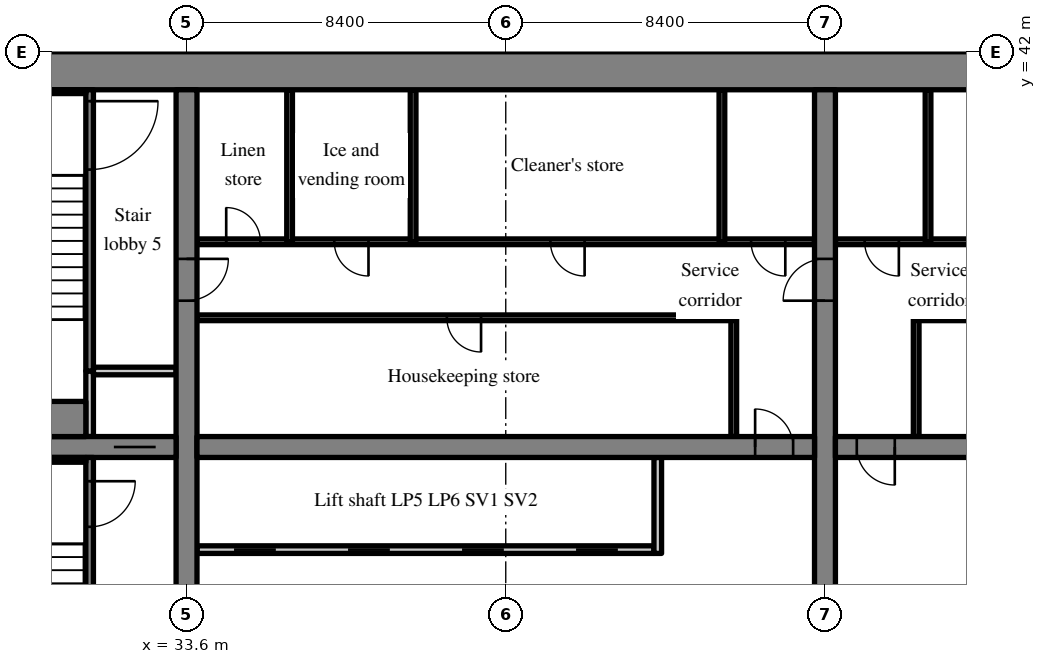
"""IFC4 building model, lengths in metres.
Left out: names, types, materials, properties, quantities, classifications, styles, units other than length and angle.
Written with IfcOpenShell. Run it as: python <this file> out.ifc"""

import sys

from ifc_helpers import new_model, si_unit, direction, frame, frame_2d, origin, place, context, subcontext, project, spatial, rectangle, extrude, source, transform, mapped, element, fill, save


model = new_model("IFC4")
c1 = context("Model", 3, precision=1e-05, world=origin(), true_north=direction((0.0, 1.0)))
c2 = subcontext(c1, "Body", "Model", "MODEL_VIEW")
j1 = project(units=[si_unit("LENGTHUNIT", "METRE"), si_unit("PLANEANGLEUNIT", "RADIAN")], contexts=[c1])
p1 = place(None, origin())
s1 = spatial("IfcSite", under=j1, at=p1, CompositionType="ELEMENT")
p2 = place(p1, origin())
s2 = spatial("IfcBuilding", under=s1, at=p2, CompositionType="ELEMENT")
p3 = place(p2, frame((0.0, 0.0, 54.4)))
s3 = spatial("IfcBuildingStorey", under=s2, at=p3, CompositionType="ELEMENT", Elevation=54.4)
m1 = source(origin(), c2, "Body", "SweptSolid", [
    extrude(rectangle(XDim=50.4, YDim=1.0, at=frame_2d((25.2, 0.0))), origin(), (0.0, 0.0, 1.0), 3.52),
])
p4 = place(p3, frame((25.2, 41.5, 0.0), z_axis=(0.0, 0.0, 1.0), x_axis=(1.0, 0.0, 0.0)))
e1 = element("IfcWall", 1, at=p4, inside=s3, PredefinedType="SHEAR", context=c2, shape_type="MappedRepresentation", body=[
    mapped(m1, transform((0.0, 0.0, 0.0), scale=1.0)),
])
m2 = source(origin(), c2, "Body", "SweptSolid", [
    extrude(rectangle(XDim=18.0, YDim=0.55, at=frame_2d((9.0, 0.0))), origin(), (0.0, 0.0, 1.0), 3.52),
])
p5 = place(p3, frame((33.6, 23.0, 0.0), z_axis=(0.0, 0.0, 1.0), x_axis=(0.0, 1.0, 0.0)))
e2 = element("IfcWall", 2, at=p5, inside=s3, PredefinedType="SHEAR", context=c2, shape_type="MappedRepresentation", body=[
    mapped(m2, transform((0.0, 0.0, 0.0), scale=1.0)),
])
m3 = source(origin(), c2, "Body", "SweptSolid", [
    extrude(rectangle(XDim=1.1, YDim=2.1, at=frame_2d((0.55, 1.05))), frame((0.0, 0.285, 0.0), z_axis=(0.0, -1.0, 0.0), x_axis=(1.0, 0.0, 0.0)), (0.0, 0.0, 1.0), 0.57),
])
p6 = place(p5, frame((12.45, 0.0, 0.0)))
e3 = element("IfcOpeningElement", 3, at=p6, cuts=e2, PredefinedType="OPENING", context=c2, shape_type="MappedRepresentation", body=[
    mapped(m3, transform((0.0, 0.0, 0.0), scale=1.0)),
])
p7 = place(p3, frame((50.4, 23.0, 0.0), z_axis=(0.0, 0.0, 1.0), x_axis=(0.0, 1.0, 0.0)))
e4 = element("IfcWall", 4, at=p7, inside=s3, PredefinedType="SHEAR", context=c2, shape_type="MappedRepresentation", body=[
    mapped(m2, transform((0.0, 0.0, 0.0), scale=1.0)),
])
p8 = place(p7, frame((12.45, 0.0, 0.0)))
e5 = element("IfcOpeningElement", 5, at=p8, cuts=e4, PredefinedType="OPENING", context=c2, shape_type="MappedRepresentation", body=[
    mapped(m3, transform((0.0, 0.0, 0.0), scale=1.0)),
])
m4 = source(origin(), c2, "Body", "SweptSolid", [
    extrude(rectangle(XDim=7.125, YDim=0.55, at=frame_2d((3.562, 0.0))), origin(), (0.0, 0.0, 1.0), 3.52),
])
p9 = place(p3, frame((26.2, 31.6, 0.0), z_axis=(0.0, 0.0, 1.0), x_axis=(1.0, 0.0, 0.0)))
e6 = element("IfcWall", 6, at=p9, inside=s3, PredefinedType="SHEAR", context=c2, shape_type="MappedRepresentation", body=[
    mapped(m4, transform((0.0, 0.0, 0.0), scale=1.0)),
])
p10 = place(p9, frame((5.488, 0.0, 0.0)))
e7 = element("IfcOpeningElement", 7, at=p10, cuts=e6, PredefinedType="OPENING", context=c2, shape_type="MappedRepresentation", body=[
    mapped(m3, transform((0.0, 0.0, 0.0), scale=1.0)),
])
m5 = source(origin(), c2, "Body", "SweptSolid", [
    extrude(rectangle(XDim=16.25, YDim=0.55, at=frame_2d((8.125, 0.0))), origin(), (0.0, 0.0, 1.0), 3.52),
])
p11 = place(p3, frame((33.875, 31.6, 0.0), z_axis=(0.0, 0.0, 1.0), x_axis=(1.0, 0.0, 0.0)))
e8 = element("IfcWall", 8, at=p11, inside=s3, PredefinedType="SHEAR", context=c2, shape_type="MappedRepresentation", body=[
    mapped(m5, transform((0.0, 0.0, 0.0), scale=1.0)),
])
m6 = source(origin(), c2, "Body", "SweptSolid", [
    extrude(rectangle(XDim=1.0, YDim=2.1, at=frame_2d((0.5, 1.05))), frame((0.0, 0.285, 0.0), z_axis=(0.0, -1.0, 0.0), x_axis=(1.0, 0.0, 0.0)), (0.0, 0.0, 1.0), 0.57),
])
p12 = place(p11, frame((14.687, 0.0, 0.0)))
e9 = element("IfcOpeningElement", 9, at=p12, cuts=e8, PredefinedType="OPENING", context=c2, shape_type="MappedRepresentation", body=[
    mapped(m6, transform((0.0, 0.0, 0.0), scale=1.0)),
])
p13 = place(p3, frame((50.675, 31.6, 0.0), z_axis=(0.0, 0.0, 1.0), x_axis=(1.0, 0.0, 0.0)))
e10 = element("IfcWall", 10, at=p13, inside=s3, PredefinedType="SHEAR", context=c2, shape_type="MappedRepresentation", body=[
    mapped(m5, transform((0.0, 0.0, 0.0), scale=1.0)),
])
p14 = place(p13, frame((0.562, 0.0, 0.0)))
e11 = element("IfcOpeningElement", 11, at=p14, cuts=e10, PredefinedType="OPENING", context=c2, shape_type="MappedRepresentation", body=[
    mapped(m6, transform((0.0, 0.0, 0.0), scale=1.0)),
])
m7 = source(origin(), c2, "Body", "SweptSolid", [
    extrude(rectangle(XDim=12.025, YDim=0.2, at=frame_2d((6.012, 0.0))), origin(), (0.0, 0.0, 1.0), 3.52),
])
p15 = place(p3, frame((33.875, 28.9, 0.0), z_axis=(0.0, 0.0, 1.0), x_axis=(1.0, 0.0, 0.0)))
e12 = element("IfcWall", 12, at=p15, inside=s3, PredefinedType="SOLIDWALL", context=c2, shape_type="MappedRepresentation", body=[
    mapped(m7, transform((0.0, 0.0, 0.0), scale=1.0)),
])
m8 = source(origin(), c2, "Body", "SweptSolid", [
    extrude(rectangle(XDim=1.1, YDim=2.1, at=frame_2d((0.55, 1.05))), frame((0.0, 0.11, 0.0), z_axis=(0.0, -1.0, 0.0), x_axis=(1.0, 0.0, 0.0)), (0.0, 0.0, 1.0), 0.22),
])
p16 = place(p15, frame((0.975, 0.0, 0.0)))
e13 = element("IfcOpeningElement", 13, at=p16, cuts=e12, PredefinedType="OPENING", context=c2, shape_type="MappedRepresentation", body=[
    mapped(m8, transform((0.0, 0.0, 0.0), scale=1.0)),
])
p17 = place(p15, frame((3.975, 0.0, 0.0)))
e14 = element("IfcOpeningElement", 14, at=p17, cuts=e12, PredefinedType="OPENING", context=c2, shape_type="MappedRepresentation", body=[
    mapped(m8, transform((0.0, 0.0, 0.0), scale=1.0)),
])
p18 = place(p15, frame((6.975, 0.0, 0.0)))
e15 = element("IfcOpeningElement", 15, at=p18, cuts=e12, PredefinedType="OPENING", context=c2, shape_type="MappedRepresentation", body=[
    mapped(m8, transform((0.0, 0.0, 0.0), scale=1.0)),
])
p19 = place(p15, frame((9.975, 0.0, 0.0)))
e16 = element("IfcOpeningElement", 16, at=p19, cuts=e12, PredefinedType="OPENING", context=c2, shape_type="MappedRepresentation", body=[
    mapped(m8, transform((0.0, 0.0, 0.0), scale=1.0)),
])
m9 = source(origin(), c2, "Body", "SweptSolid", [
    extrude(rectangle(XDim=2.525, YDim=0.2, at=frame_2d((1.262, 0.0))), origin(), (0.0, 0.0, 1.0), 3.52),
])
p20 = place(p3, frame((46.0, 28.8, 0.0), z_axis=(0.0, 0.0, 1.0), x_axis=(0.0, 1.0, 0.0)))
e17 = element("IfcWall", 17, at=p20, inside=s3, PredefinedType="SOLIDWALL", context=c2, shape_type="MappedRepresentation", body=[
    mapped(m9, transform((0.0, 0.0, 0.0), scale=1.0)),
])
m10 = source(origin(), c2, "Body", "SweptSolid", [
    extrude(rectangle(XDim=3.125, YDim=0.15, at=frame_2d((1.562, 0.0))), origin(), (0.0, 0.0, 1.0), 3.52),
])
p21 = place(p3, frame((48.0, 31.875, 0.0), z_axis=(0.0, 0.0, 1.0), x_axis=(0.0, 1.0, 0.0)))
e18 = element("IfcWall", 18, at=p21, inside=s3, PredefinedType="PARTITIONING", context=c2, shape_type="MappedRepresentation", body=[
    mapped(m10, transform((0.0, 0.0, 0.0), scale=1.0)),
])
m11 = source(origin(), c2, "Body", "SweptSolid", [
    extrude(rectangle(XDim=14.125, YDim=0.15, at=frame_2d((7.062, 0.0))), origin(), (0.0, 0.0, 1.0), 3.52),
])
p22 = place(p3, frame((33.875, 35.0, 0.0), z_axis=(0.0, 0.0, 1.0), x_axis=(1.0, 0.0, 0.0)))
e19 = element("IfcWall", 19, at=p22, inside=s3, PredefinedType="PARTITIONING", context=c2, shape_type="MappedRepresentation", body=[
    mapped(m11, transform((0.0, 0.0, 0.0), scale=1.0)),
])
m12 = source(origin(), c2, "Body", "SweptSolid", [
    extrude(rectangle(XDim=0.9, YDim=2.1, at=frame_2d((0.45, 1.05))), frame((0.0, 0.085, 0.0), z_axis=(0.0, -1.0, 0.0), x_axis=(1.0, 0.0, 0.0)), (0.0, 0.0, 1.0), 0.17),
])
p23 = place(p22, frame((6.575, 0.0, 0.0)))
e20 = element("IfcOpeningElement", 20, at=p23, cuts=e19, PredefinedType="OPENING", context=c2, shape_type="MappedRepresentation", body=[
    mapped(m12, transform((0.0, 0.0, 0.0), scale=1.0)),
])
m13 = source(origin(), c2, "Body", "SweptSolid", [
    extrude(rectangle(XDim=16.25, YDim=0.15, at=frame_2d((8.125, 0.0))), origin(), (0.0, 0.0, 1.0), 3.52),
])
p24 = place(p3, frame((33.875, 37.0, 0.0), z_axis=(0.0, 0.0, 1.0), x_axis=(1.0, 0.0, 0.0)))
e21 = element("IfcWall", 21, at=p24, inside=s3, PredefinedType="PARTITIONING", context=c2, shape_type="MappedRepresentation", body=[
    mapped(m13, transform((0.0, 0.0, 0.0), scale=1.0)),
])
p25 = place(p24, frame((0.769, 0.0, 0.0)))
e22 = element("IfcOpeningElement", 22, at=p25, cuts=e21, PredefinedType="OPENING", context=c2, shape_type="MappedRepresentation", body=[
    mapped(m12, transform((0.0, 0.0, 0.0), scale=1.0)),
])
p26 = place(p24, frame((3.613, 0.0, 0.0)))
e23 = element("IfcOpeningElement", 23, at=p26, cuts=e21, PredefinedType="OPENING", context=c2, shape_type="MappedRepresentation", body=[
    mapped(m12, transform((0.0, 0.0, 0.0), scale=1.0)),
])
p27 = place(p24, frame((9.3, 0.0, 0.0)))
e24 = element("IfcOpeningElement", 24, at=p27, cuts=e21, PredefinedType="OPENING", context=c2, shape_type="MappedRepresentation", body=[
    mapped(m12, transform((0.0, 0.0, 0.0), scale=1.0)),
])
p28 = place(p24, frame((14.581, 0.0, 0.0)))
e25 = element("IfcOpeningElement", 25, at=p28, cuts=e21, PredefinedType="OPENING", context=c2, shape_type="MappedRepresentation", body=[
    mapped(m12, transform((0.0, 0.0, 0.0), scale=1.0)),
])
m14 = source(origin(), c2, "Body", "SweptSolid", [
    extrude(rectangle(XDim=4.0, YDim=0.15, at=frame_2d((2.0, 0.0))), origin(), (0.0, 0.0, 1.0), 3.52),
])
for number, where, z_axis, x_axis in (
    (26, (36.312, 37.0, 0.0), (0.0, 0.0, 1.0), (0.0, 1.0, 0.0)),
    (27, (39.562, 37.0, 0.0), (0.0, 0.0, 1.0), (0.0, 1.0, 0.0)),
    (28, (47.688, 37.0, 0.0), (0.0, 0.0, 1.0), (0.0, 1.0, 0.0)),
):
    element("IfcWall", number, at=place(p3, frame(where, z_axis=z_axis, x_axis=x_axis)), inside=s3, PredefinedType="PARTITIONING", context=c2, shape_type="MappedRepresentation", body=[
        mapped(m14, transform((0.0, 0.0, 0.0), scale=1.0)),
    ])
p29 = place(p3, frame((52.8, 31.875, 0.0), z_axis=(0.0, 0.0, 1.0), x_axis=(0.0, 1.0, 0.0)))
e29 = element("IfcWall", 29, at=p29, inside=s3, PredefinedType="PARTITIONING", context=c2, shape_type="MappedRepresentation", body=[
    mapped(m10, transform((0.0, 0.0, 0.0), scale=1.0)),
])
p30 = place(p3, frame((66.925, 35.0, 0.0), z_axis=(0.0, 0.0, 1.0), x_axis=(-1.0, 0.0, 0.0)))
e30 = element("IfcWall", 30, at=p30, inside=s3, PredefinedType="PARTITIONING", context=c2, shape_type="MappedRepresentation", body=[
    mapped(m11, transform((0.0, 0.0, 0.0), scale=1.0)),
])
p31 = place(p30, frame((3.414, 0.0, 0.0)))
e31 = element("IfcOpeningElement", 31, at=p31, cuts=e30, PredefinedType="OPENING", context=c2, shape_type="MappedRepresentation", body=[
    mapped(m12, transform((0.0, 0.0, 0.0), scale=1.0)),
])
p32 = place(p30, frame((10.439, 0.0, 0.0)))
e32 = element("IfcOpeningElement", 32, at=p32, cuts=e30, PredefinedType="OPENING", context=c2, shape_type="MappedRepresentation", body=[
    mapped(m12, transform((0.0, 0.0, 0.0), scale=1.0)),
])
p33 = place(p3, frame((66.925, 37.0, 0.0), z_axis=(0.0, 0.0, 1.0), x_axis=(-1.0, 0.0, 0.0)))
e33 = element("IfcWall", 33, at=p33, inside=s3, PredefinedType="PARTITIONING", context=c2, shape_type="MappedRepresentation", body=[
    mapped(m13, transform((0.0, 0.0, 0.0), scale=1.0)),
])
p34 = place(p33, frame((6.456, 0.0, 0.0)))
e34 = element("IfcOpeningElement", 34, at=p34, cuts=e33, PredefinedType="OPENING", context=c2, shape_type="MappedRepresentation", body=[
    mapped(m12, transform((0.0, 0.0, 0.0), scale=1.0)),
])
p35 = place(p33, frame((14.581, 0.0, 0.0)))
e35 = element("IfcOpeningElement", 35, at=p35, cuts=e33, PredefinedType="OPENING", context=c2, shape_type="MappedRepresentation", body=[
    mapped(m12, transform((0.0, 0.0, 0.0), scale=1.0)),
])
p36 = place(p3, frame((53.112, 37.0, 0.0), z_axis=(0.0, 0.0, 1.0), x_axis=(0.0, 1.0, 0.0)))
e36 = element("IfcWall", 36, at=p36, inside=s3, PredefinedType="PARTITIONING", context=c2, shape_type="MappedRepresentation", body=[
    mapped(m14, transform((0.0, 0.0, 0.0), scale=1.0)),
])
m15 = source(origin(), c2, "Body", "SweptSolid", [
    extrude(rectangle(XDim=8.325, YDim=0.2, at=frame_2d((4.163, 0.0))), origin(), (0.0, 0.0, 1.0), 3.52),
])
p37 = place(p3, frame((31.05, 23.0, 0.0), z_axis=(0.0, 0.0, 1.0), x_axis=(0.0, 1.0, 0.0)))
e37 = element("IfcWall", 37, at=p37, inside=s3, PredefinedType="SOLIDWALL", context=c2, shape_type="MappedRepresentation", body=[
    mapped(m15, transform((0.0, 0.0, 0.0), scale=1.0)),
])
m16 = source(origin(), c2, "Body", "SweptSolid", [
    extrude(rectangle(XDim=1.2, YDim=2.1, at=frame_2d((0.6, 1.05))), frame((0.0, 0.11, 0.0), z_axis=(0.0, -1.0, 0.0), x_axis=(1.0, 0.0, 0.0)), (0.0, 0.0, 1.0), 0.22),
])
p38 = place(p37, frame((6.5, 0.0, 0.0)))
e38 = element("IfcOpeningElement", 38, at=p38, cuts=e37, PredefinedType="OPENING", context=c2, shape_type="MappedRepresentation", body=[
    mapped(m16, transform((0.0, 0.0, 0.0), scale=1.0)),
])
m17 = source(origin(), c2, "Body", "SweptSolid", [
    extrude(rectangle(XDim=1.725, YDim=0.2, at=frame_2d((0.863, 0.0))), origin(), (0.0, 0.0, 1.0), 3.52),
])
p39 = place(p3, frame((31.05, 31.875, 0.0), z_axis=(0.0, 0.0, 1.0), x_axis=(0.0, 1.0, 0.0)))
e39 = element("IfcWall", 39, at=p39, inside=s3, PredefinedType="SOLIDWALL", context=c2, shape_type="MappedRepresentation", body=[
    mapped(m17, transform((0.0, 0.0, 0.0), scale=1.0)),
])
m18 = source(origin(), c2, "Body", "SweptSolid", [
    extrude(rectangle(XDim=2.175, YDim=0.2, at=frame_2d((1.087, 0.0))), origin(), (0.0, 0.0, 1.0), 3.52),
])
p40 = place(p3, frame((31.15, 33.6, 0.0), z_axis=(0.0, 0.0, 1.0), x_axis=(1.0, 0.0, 0.0)))
e40 = element("IfcWall", 40, at=p40, inside=s3, PredefinedType="SOLIDWALL", context=c2, shape_type="MappedRepresentation", body=[
    mapped(m18, transform((0.0, 0.0, 0.0), scale=1.0)),
])
m19 = source(origin(), c2, "Body", "SweptSolid", [
    extrude(rectangle(XDim=7.4, YDim=0.2, at=frame_2d((3.7, 0.0))), origin(), (0.0, 0.0, 1.0), 3.52),
])
p41 = place(p3, frame((31.05, 33.6, 0.0), z_axis=(0.0, 0.0, 1.0), x_axis=(0.0, 1.0, 0.0)))
e41 = element("IfcWall", 41, at=p41, inside=s3, PredefinedType="SOLIDWALL", context=c2, shape_type="MappedRepresentation", body=[
    mapped(m19, transform((0.0, 0.0, 0.0), scale=1.0)),
])
m20 = source(origin(), c2, "Body", "SweptSolid", [
    extrude(rectangle(XDim=1.8, YDim=2.1, at=frame_2d((0.9, 1.05))), frame((0.0, 0.11, 0.0), z_axis=(0.0, -1.0, 0.0), x_axis=(1.0, 0.0, 0.0)), (0.0, 0.0, 1.0), 0.22),
])
p42 = place(p41, frame((5.3, 0.0, 0.0)))
e42 = element("IfcOpeningElement", 42, at=p42, cuts=e41, PredefinedType="OPENING", context=c2, shape_type="MappedRepresentation", body=[
    mapped(m20, transform((0.0, 0.0, 0.0), scale=1.0)),
])
m21 = source(origin(), c2, "Body", "SweptSolid", [
    extrude(rectangle(XDim=4.75, YDim=0.125, at=frame_2d((2.375, 0.0))), origin(), (0.0, 0.0, 1.0), 3.52),
])
p43 = place(p3, frame((26.2, 31.262, 0.0), z_axis=(0.0, 0.0, 1.0), x_axis=(1.0, 0.0, 0.0)))
e43 = element("IfcWall", 43, at=p43, inside=s3, PredefinedType="SOLIDWALL", context=c2, shape_type="MappedRepresentation", body=[
    mapped(m21, transform((0.0, 0.0, 0.0), scale=1.0)),
])
m22 = source(origin(), c2, "Body", "SweptSolid", [
    extrude(rectangle(XDim=4.75, YDim=0.1, at=frame_2d((2.375, 0.0))), origin(), (0.0, 0.0, 1.0), 3.52),
])
p44 = place(p3, frame((26.2, 40.95, 0.0), z_axis=(0.0, 0.0, 1.0), x_axis=(1.0, 0.0, 0.0)))
e44 = element("IfcWall", 44, at=p44, inside=s3, PredefinedType="SOLIDWALL", context=c2, shape_type="MappedRepresentation", body=[
    mapped(m22, transform((0.0, 0.0, 0.0), scale=1.0)),
])
m23 = source(origin(), c2, "Body", "SweptSolid", [
    extrude(rectangle(XDim=4.75, YDim=0.925, at=frame_2d((2.375, 0.0))), origin(), (0.0, 0.0, 1.0), 3.52),
])
p45 = place(p3, frame((26.2, 32.337, 0.0), z_axis=(0.0, 0.0, 1.0), x_axis=(1.0, 0.0, 0.0)))
e45 = element("IfcWall", 45, at=p45, inside=s3, PredefinedType="SOLIDWALL", context=c2, shape_type="MappedRepresentation", body=[
    mapped(m23, transform((0.0, 0.0, 0.0), scale=1.0)),
])
m24 = source(origin(), c2, "Body", "SweptSolid", [
    extrude(rectangle(XDim=1.0, YDim=2.1, at=frame_2d((0.5, 1.05))), frame((0.0, 0.025, 0.0), z_axis=(0.0, -1.0, 0.0), x_axis=(1.0, 0.0, 0.0)), (0.0, 0.0, 1.0), 0.05),
])
p46 = place(p12, origin())
e46 = element("IfcDoor", 46, at=p46, inside=s3, OperationType="SINGLE_SWING_LEFT", PredefinedType="DOOR", context=c2, shape_type="MappedRepresentation", body=[
    mapped(m24, transform((0.0, 0.0, 0.0), scale=1.0)),
])
fill(e9, e46)
m25 = source(origin(), c2, "Body", "SweptSolid", [
    extrude(rectangle(XDim=1.1, YDim=2.1, at=frame_2d((0.55, 1.05))), frame((0.0, 0.025, 0.0), z_axis=(0.0, -1.0, 0.0), x_axis=(1.0, 0.0, 0.0)), (0.0, 0.0, 1.0), 0.05),
])
p47 = place(p16, origin())
e47 = element("IfcDoor", 47, at=p47, inside=s3, OperationType="SLIDING_TO_LEFT", PredefinedType="DOOR", context=c2, shape_type="MappedRepresentation", body=[
    mapped(m25, transform((0.0, 0.0, 0.0), scale=1.0)),
])
fill(e13, e47)
p48 = place(p17, origin())
e48 = element("IfcDoor", 48, at=p48, inside=s3, OperationType="SLIDING_TO_RIGHT", PredefinedType="DOOR", context=c2, shape_type="MappedRepresentation", body=[
    mapped(m25, transform((0.0, 0.0, 0.0), scale=1.0)),
])
fill(e14, e48)
p49 = place(p18, origin())
e49 = element("IfcDoor", 49, at=p49, inside=s3, OperationType="SLIDING_TO_LEFT", PredefinedType="DOOR", context=c2, shape_type="MappedRepresentation", body=[
    mapped(m25, transform((0.0, 0.0, 0.0), scale=1.0)),
])
fill(e15, e49)
p50 = place(p19, origin())
e50 = element("IfcDoor", 50, at=p50, inside=s3, OperationType="SLIDING_TO_RIGHT", PredefinedType="DOOR", context=c2, shape_type="MappedRepresentation", body=[
    mapped(m25, transform((0.0, 0.0, 0.0), scale=1.0)),
])
fill(e16, e50)
m26 = source(origin(), c2, "Body", "SweptSolid", [
    extrude(rectangle(XDim=0.9, YDim=2.1, at=frame_2d((0.45, 1.05))), frame((0.0, 0.025, 0.0), z_axis=(0.0, -1.0, 0.0), x_axis=(1.0, 0.0, 0.0)), (0.0, 0.0, 1.0), 0.05),
])
p51 = place(p23, origin())
e51 = element("IfcDoor", 51, at=p51, inside=s3, OperationType="SINGLE_SWING_RIGHT", PredefinedType="DOOR", context=c2, shape_type="MappedRepresentation", body=[
    mapped(m26, transform((0.0, 0.0, 0.0), scale=1.0)),
])
fill(e20, e51)
p52 = place(p25, origin())
e52 = element("IfcDoor", 52, at=p52, inside=s3, OperationType="SINGLE_SWING_LEFT", PredefinedType="DOOR", context=c2, shape_type="MappedRepresentation", body=[
    mapped(m26, transform((0.0, 0.0, 0.0), scale=1.0)),
])
fill(e22, e52)
p53 = place(p26, origin())
e53 = element("IfcDoor", 53, at=p53, inside=s3, OperationType="SINGLE_SWING_RIGHT", PredefinedType="DOOR", context=c2, shape_type="MappedRepresentation", body=[
    mapped(m26, transform((0.0, 0.0, 0.0), scale=1.0)),
])
fill(e23, e53)
p54 = place(p27, origin())
e54 = element("IfcDoor", 54, at=p54, inside=s3, OperationType="SINGLE_SWING_RIGHT", PredefinedType="DOOR", context=c2, shape_type="MappedRepresentation", body=[
    mapped(m26, transform((0.0, 0.0, 0.0), scale=1.0)),
])
fill(e24, e54)
p55 = place(p28, origin())
e55 = element("IfcDoor", 55, at=p55, inside=s3, OperationType="SINGLE_SWING_RIGHT", PredefinedType="DOOR", context=c2, shape_type="MappedRepresentation", body=[
    mapped(m26, transform((0.0, 0.0, 0.0), scale=1.0)),
])
fill(e25, e55)
p56 = place(p14, origin())
e56 = element("IfcDoor", 56, at=p56, inside=s3, OperationType="SINGLE_SWING_RIGHT", PredefinedType="DOOR", context=c2, shape_type="MappedRepresentation", body=[
    mapped(m24, transform((0.0, 0.0, 0.0), scale=1.0)),
])
fill(e11, e56)
p57 = place(p35, origin())
e57 = element("IfcDoor", 57, at=p57, inside=s3, OperationType="SINGLE_SWING_LEFT", PredefinedType="DOOR", context=c2, shape_type="MappedRepresentation", body=[
    mapped(m26, transform((0.0, 0.0, 0.0), scale=1.0)),
])
fill(e35, e57)
m27 = source(origin(), c2, "Body", "SweptSolid", [
    extrude(rectangle(XDim=1.2, YDim=2.1, at=frame_2d((0.6, 1.05))), frame((0.0, 0.025, 0.0), z_axis=(0.0, -1.0, 0.0), x_axis=(1.0, 0.0, 0.0)), (0.0, 0.0, 1.0), 0.05),
])
p58 = place(p38, origin())
e58 = element("IfcDoor", 58, at=p58, inside=s3, OperationType="SINGLE_SWING_RIGHT", PredefinedType="DOOR", context=c2, shape_type="MappedRepresentation", body=[
    mapped(m27, transform((0.0, 0.0, 0.0), scale=1.0)),
])
fill(e38, e58)
p59 = place(p10, origin())
e59 = element("IfcDoor", 59, at=p59, inside=s3, OperationType="SLIDING_TO_LEFT", PredefinedType="DOOR", context=c2, shape_type="MappedRepresentation", body=[
    mapped(m25, transform((0.0, 0.0, 0.0), scale=1.0)),
])
fill(e7, e59)
m28 = source(origin(), c2, "Body", "SweptSolid", [
    extrude(rectangle(XDim=1.8, YDim=2.1, at=frame_2d((0.9, 1.05))), frame((0.0, 0.025, 0.0), z_axis=(0.0, -1.0, 0.0), x_axis=(1.0, 0.0, 0.0)), (0.0, 0.0, 1.0), 0.05),
])
p60 = place(p42, origin())
e60 = element("IfcDoor", 60, at=p60, inside=s3, OperationType="SINGLE_SWING_RIGHT", PredefinedType="DOOR", context=c2, shape_type="MappedRepresentation", body=[
    mapped(m28, transform((0.0, 0.0, 0.0), scale=1.0)),
])
fill(e42, e60)
p61 = place(p6, origin())
e61 = element("IfcDoor", 61, at=p61, inside=s3, OperationType="SINGLE_SWING_RIGHT", PredefinedType="DOOR", context=c2, shape_type="MappedRepresentation", body=[
    mapped(m25, transform((0.0, 0.0, 0.0), scale=1.0)),
])
fill(e3, e61)
p62 = place(p8, origin())
e62 = element("IfcDoor", 62, at=p62, inside=s3, OperationType="SINGLE_SWING_LEFT", PredefinedType="DOOR", context=c2, shape_type="MappedRepresentation", body=[
    mapped(m25, transform((0.0, 0.0, 0.0), scale=1.0)),
])
fill(e5, e62)
save(model, sys.argv[1])
